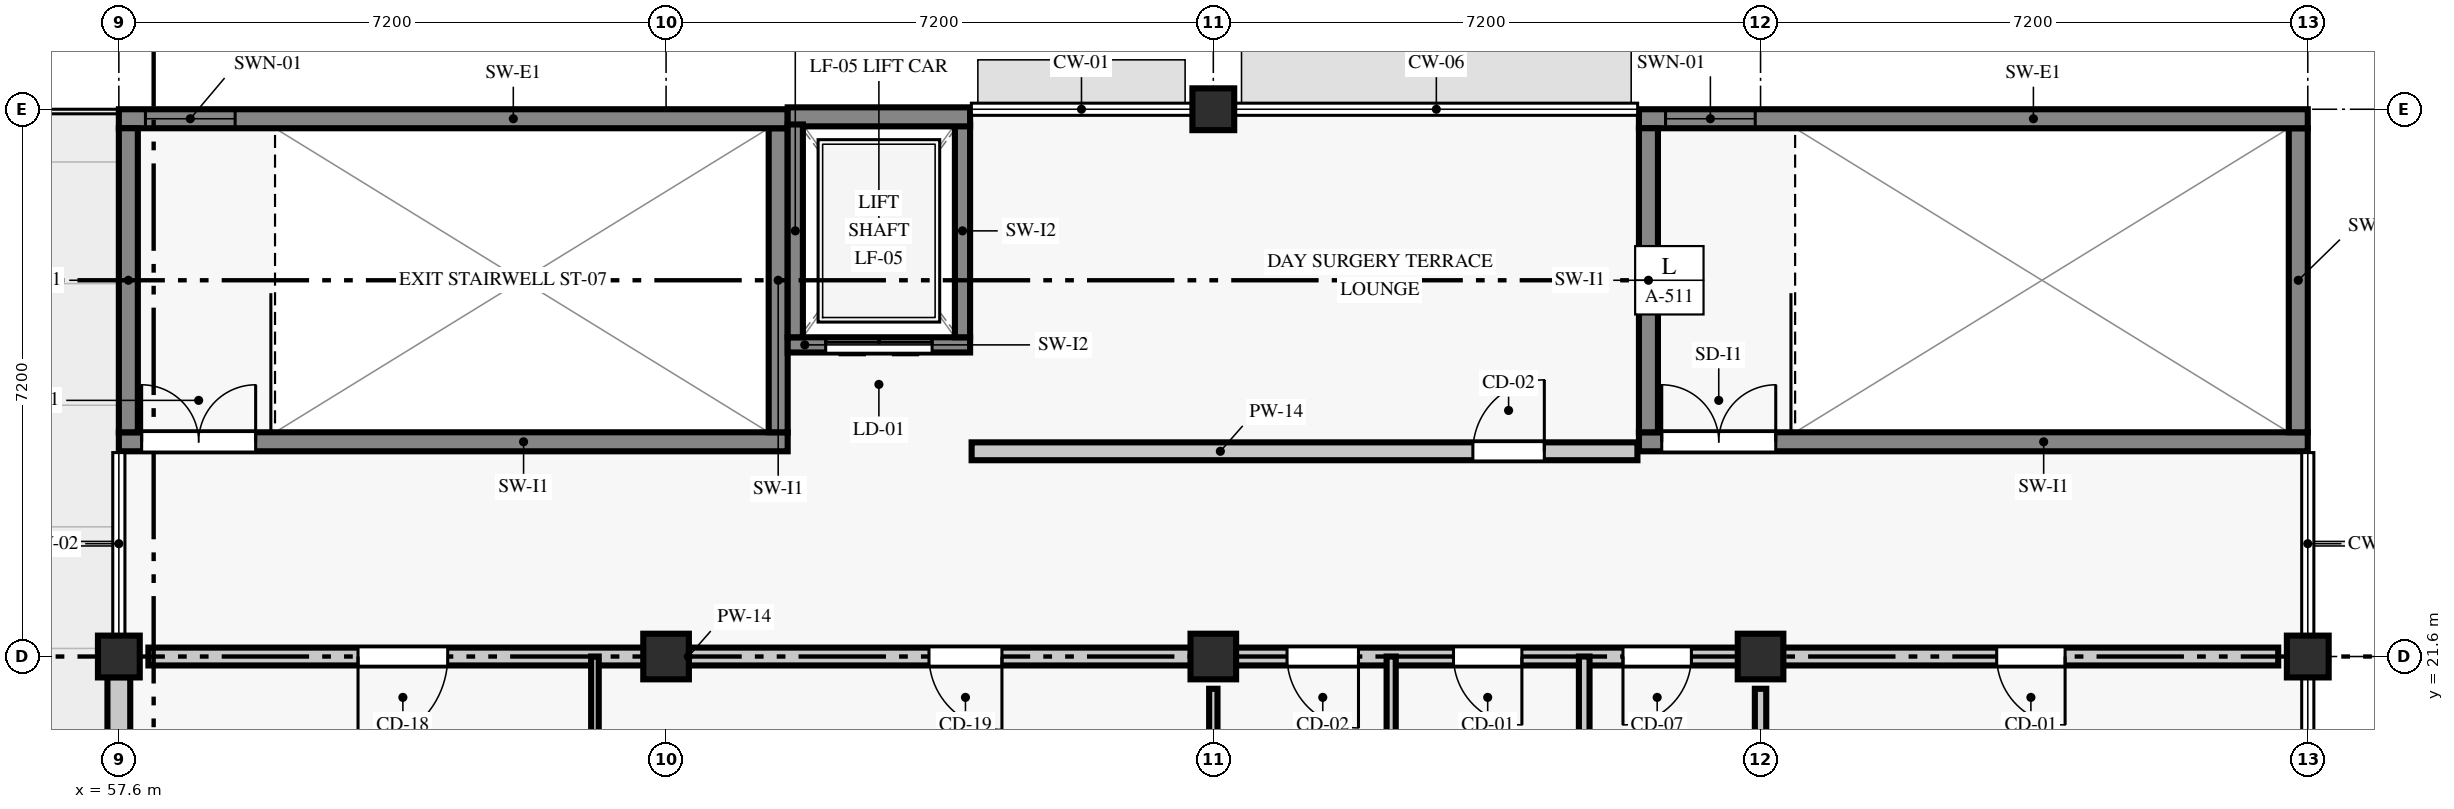
"""IFC4 building model, lengths in metres.
Left out: names, types, materials, properties, quantities, classifications, styles, units other than length and angle.
Written with IfcOpenShell. Run it as: python <this file> out.ifc"""

import sys

from ifc_helpers import new_model, si_unit, direction, frame, frame_2d, origin, origin_2d, place, context, subcontext, project, spatial, rectangle, extrude, element, fill, save


model = new_model("IFC4")
c1 = context("Model", 3, precision=1e-05, world=origin(), true_north=direction((0.0, 1.0)))
c2 = subcontext(c1, "Body", "Model", "MODEL_VIEW")
j1 = project(units=[si_unit("LENGTHUNIT", "METRE"), si_unit("PLANEANGLEUNIT", "RADIAN")], contexts=[c1])
p1 = place(None, origin())
s1 = spatial("IfcSite", under=j1, at=p1, CompositionType="ELEMENT")
p2 = place(p1, origin())
s2 = spatial("IfcBuilding", under=s1, at=p2, CompositionType="ELEMENT")
p3 = place(p2, frame((0.0, 0.0, 13.8)))
s3 = spatial("IfcBuildingStorey", under=s2, at=p3, CompositionType="ELEMENT", Elevation=13.8)
p4 = place(p3, frame((57.6, 21.6, 0.0), z_axis=(0.0, 0.0, 1.0), x_axis=(1.0, 0.0, 0.0)))
e1 = element("IfcColumn", 1, at=p4, inside=s3, PredefinedType="COLUMN", context=c2, shape_type="SweptSolid", body=[
    extrude(rectangle(XDim=0.55, YDim=0.55, at=origin_2d()), origin(), (0.0, 0.0, 1.0), 4.2),
])
for number, where, z_axis, x_axis in (
    (2, (64.8, 21.6, 0.0), (0.0, 0.0, 1.0), (1.0, 0.0, 0.0)),
    (3, (72.0, 21.6, 0.0), (0.0, 0.0, 1.0), (1.0, 0.0, 0.0)),
):
    element("IfcColumn", number, at=place(p3, frame(where, z_axis=z_axis, x_axis=x_axis)), inside=s3, PredefinedType="COLUMN", context=c2, shape_type="SweptSolid", body=[
        extrude(rectangle(XDim=0.6, YDim=0.6, at=origin_2d()), origin(), (0.0, 0.0, 1.0), 4.2),
    ])
p5 = place(p3, frame((72.0, 28.8, 0.0), z_axis=(0.0, 0.0, 1.0), x_axis=(1.0, 0.0, 0.0)))
e4 = element("IfcColumn", 4, at=p5, inside=s3, PredefinedType="COLUMN", context=c2, shape_type="SweptSolid", body=[
    extrude(rectangle(XDim=0.55, YDim=0.55, at=origin_2d()), origin(), (0.0, 0.0, 1.0), 4.2),
])
p6 = place(p3, frame((79.2, 21.6, 0.0), z_axis=(0.0, 0.0, 1.0), x_axis=(1.0, 0.0, 0.0)))
e5 = element("IfcColumn", 5, at=p6, inside=s3, PredefinedType="COLUMN", context=c2, shape_type="SweptSolid", body=[
    extrude(rectangle(XDim=0.6, YDim=0.6, at=origin_2d()), origin(), (0.0, 0.0, 1.0), 4.2),
])
p7 = place(p3, frame((86.4, 21.6, 0.0), z_axis=(0.0, 0.0, 1.0), x_axis=(1.0, 0.0, 0.0)))
e6 = element("IfcColumn", 6, at=p7, inside=s3, PredefinedType="COLUMN", context=c2, shape_type="SweptSolid", body=[
    extrude(rectangle(XDim=0.55, YDim=0.55, at=origin_2d()), origin(), (0.0, 0.0, 1.0), 4.2),
])
p8 = place(p3, frame((57.6, 21.329, 0.0), z_axis=(0.0, 0.0, 1.0), x_axis=(0.0, -1.0, 0.0)))
e7 = element("IfcWall", 7, at=p8, inside=s3, PredefinedType="STANDARD", context=c2, shape_type="SweptSolid", body=[
    extrude(rectangle(XDim=6.658, YDim=0.3, at=frame_2d((3.329, 0.0))), origin(), (0.0, 0.0, 1.0), 3.55),
])
p9 = place(p8, frame((2.689, 0.0, 0.0)))
e8 = element("IfcOpeningElement", 8, at=p9, cuts=e7, PredefinedType="OPENING", context=c2, shape_type="SweptSolid", body=[
    extrude(rectangle(XDim=1.28, YDim=2.15, at=frame_2d((0.64, 1.075))), frame((0.0, 0.16, 0.0), z_axis=(0.0, -1.0, 0.0), x_axis=(1.0, 0.0, 0.0)), (0.0, 0.0, 1.0), 0.32),
])
p10 = place(p3, frame((57.6, 24.425, 0.0), z_axis=(0.0, 0.0, 1.0), x_axis=(1.0, 0.0, 0.0)))
e9 = element("IfcWall", 9, at=p10, inside=s3, PredefinedType="SHEAR", context=c2, shape_type="SweptSolid", body=[
    extrude(rectangle(XDim=8.8, YDim=0.25, at=frame_2d((4.4, 0.0))), origin(), (0.0, 0.0, 1.0), 4.2),
])
p11 = place(p10, frame((0.3, 0.0, 0.0)))
e10 = element("IfcOpeningElement", 10, at=p11, cuts=e9, PredefinedType="OPENING", context=c2, shape_type="SweptSolid", body=[
    extrude(rectangle(XDim=1.5, YDim=2.15, at=frame_2d((0.75, 1.075))), frame((0.0, 0.135, 0.0), z_axis=(0.0, -1.0, 0.0), x_axis=(1.0, 0.0, 0.0)), (0.0, 0.0, 1.0), 0.27),
])
p12 = place(p3, frame((66.275, 24.55, 0.0), z_axis=(0.0, 0.0, 1.0), x_axis=(0.0, 1.0, 0.0)))
e11 = element("IfcWall", 11, at=p12, inside=s3, PredefinedType="SHEAR", context=c2, shape_type="SweptSolid", body=[
    extrude(rectangle(XDim=4.0, YDim=0.25, at=frame_2d((2.0, 0.0))), origin(), (0.0, 0.0, 1.0), 4.2),
])
p13 = place(p3, frame((66.4, 28.675, 0.0), z_axis=(0.0, 0.0, 1.0), x_axis=(-1.0, 0.0, 0.0)))
e12 = element("IfcWall", 12, at=p13, inside=s3, PredefinedType="SHEAR", context=c2, shape_type="SweptSolid", body=[
    extrude(rectangle(XDim=8.8, YDim=0.25, at=frame_2d((4.4, 0.0))), origin(), (0.0, 0.0, 1.0), 4.2),
])
p14 = place(p13, frame((7.27, 0.0, 0.92)))
e13 = element("IfcOpeningElement", 13, at=p14, cuts=e12, PredefinedType="OPENING", context=c2, shape_type="SweptSolid", body=[
    extrude(rectangle(XDim=1.18, YDim=1.48, at=frame_2d((0.59, 0.74))), frame((0.0, 0.135, 0.0), z_axis=(0.0, -1.0, 0.0), x_axis=(1.0, 0.0, 0.0)), (0.0, 0.0, 1.0), 0.27),
])
p15 = place(p3, frame((57.725, 28.55, 0.0), z_axis=(0.0, 0.0, 1.0), x_axis=(0.0, -1.0, 0.0)))
e14 = element("IfcWall", 14, at=p15, inside=s3, PredefinedType="SHEAR", context=c2, shape_type="SweptSolid", body=[
    extrude(rectangle(XDim=4.0, YDim=0.25, at=frame_2d((2.0, 0.0))), origin(), (0.0, 0.0, 1.0), 4.2),
])
p16 = place(p3, frame((77.6, 24.425, 0.0), z_axis=(0.0, 0.0, 1.0), x_axis=(1.0, 0.0, 0.0)))
e15 = element("IfcWall", 15, at=p16, inside=s3, PredefinedType="SHEAR", context=c2, shape_type="SweptSolid", body=[
    extrude(rectangle(XDim=8.8, YDim=0.25, at=frame_2d((4.4, 0.0))), origin(), (0.0, 0.0, 1.0), 4.2),
])
p17 = place(p16, frame((0.3, 0.0, 0.0)))
e16 = element("IfcOpeningElement", 16, at=p17, cuts=e15, PredefinedType="OPENING", context=c2, shape_type="SweptSolid", body=[
    extrude(rectangle(XDim=1.5, YDim=2.15, at=frame_2d((0.75, 1.075))), frame((0.0, 0.135, 0.0), z_axis=(0.0, -1.0, 0.0), x_axis=(1.0, 0.0, 0.0)), (0.0, 0.0, 1.0), 0.27),
])
p18 = place(p3, frame((86.275, 24.55, 0.0), z_axis=(0.0, 0.0, 1.0), x_axis=(0.0, 1.0, 0.0)))
e17 = element("IfcWall", 17, at=p18, inside=s3, PredefinedType="SHEAR", context=c2, shape_type="SweptSolid", body=[
    extrude(rectangle(XDim=4.0, YDim=0.25, at=frame_2d((2.0, 0.0))), origin(), (0.0, 0.0, 1.0), 4.2),
])
p19 = place(p3, frame((86.4, 28.675, 0.0), z_axis=(0.0, 0.0, 1.0), x_axis=(-1.0, 0.0, 0.0)))
e18 = element("IfcWall", 18, at=p19, inside=s3, PredefinedType="SHEAR", context=c2, shape_type="SweptSolid", body=[
    extrude(rectangle(XDim=8.8, YDim=0.25, at=frame_2d((4.4, 0.0))), origin(), (0.0, 0.0, 1.0), 4.2),
])
p20 = place(p19, frame((7.27, 0.0, 0.92)))
e19 = element("IfcOpeningElement", 19, at=p20, cuts=e18, PredefinedType="OPENING", context=c2, shape_type="SweptSolid", body=[
    extrude(rectangle(XDim=1.18, YDim=1.48, at=frame_2d((0.59, 0.74))), frame((0.0, 0.135, 0.0), z_axis=(0.0, -1.0, 0.0), x_axis=(1.0, 0.0, 0.0)), (0.0, 0.0, 1.0), 0.27),
])
p21 = place(p3, frame((77.725, 28.55, 0.0), z_axis=(0.0, 0.0, 1.0), x_axis=(0.0, -1.0, 0.0)))
e20 = element("IfcWall", 20, at=p21, inside=s3, PredefinedType="SHEAR", context=c2, shape_type="SweptSolid", body=[
    extrude(rectangle(XDim=4.0, YDim=0.25, at=frame_2d((2.0, 0.0))), origin(), (0.0, 0.0, 1.0), 4.2),
])
p22 = place(p3, frame((66.4, 25.7, 0.0), z_axis=(0.0, 0.0, 1.0), x_axis=(1.0, 0.0, 0.0)))
e21 = element("IfcWall", 21, at=p22, inside=s3, PredefinedType="SHEAR", context=c2, shape_type="SweptSolid", body=[
    extrude(rectangle(XDim=2.4, YDim=0.2, at=frame_2d((1.2, 0.0))), origin(), (0.0, 0.0, 1.0), 4.2),
])
p23 = place(p22, frame((0.5, 0.0, 0.0)))
e22 = element("IfcOpeningElement", 22, at=p23, cuts=e21, PredefinedType="OPENING", context=c2, shape_type="SweptSolid", body=[
    extrude(rectangle(XDim=1.4, YDim=2.15, at=frame_2d((0.7, 1.075))), frame((0.0, 0.11, 0.0), z_axis=(0.0, -1.0, 0.0), x_axis=(1.0, 0.0, 0.0)), (0.0, 0.0, 1.0), 0.22),
])
p24 = place(p3, frame((68.7, 25.8, 0.0), z_axis=(0.0, 0.0, 1.0), x_axis=(0.0, 1.0, 0.0)))
e23 = element("IfcWall", 23, at=p24, inside=s3, PredefinedType="SHEAR", context=c2, shape_type="SweptSolid", body=[
    extrude(rectangle(XDim=2.8, YDim=0.2, at=frame_2d((1.4, 0.0))), origin(), (0.0, 0.0, 1.0), 4.2),
])
p25 = place(p3, frame((68.8, 28.7, 0.0), z_axis=(0.0, 0.0, 1.0), x_axis=(-1.0, 0.0, 0.0)))
e24 = element("IfcWall", 24, at=p25, inside=s3, PredefinedType="SHEAR", context=c2, shape_type="SweptSolid", body=[
    extrude(rectangle(XDim=2.4, YDim=0.25, at=frame_2d((1.2, 0.0))), origin(), (0.0, 0.0, 1.0), 4.2),
])
p26 = place(p3, frame((66.5, 28.6, 0.0), z_axis=(0.0, 0.0, 1.0), x_axis=(0.0, -1.0, 0.0)))
e25 = element("IfcWall", 25, at=p26, inside=s3, PredefinedType="SHEAR", context=c2, shape_type="SweptSolid", body=[
    extrude(rectangle(XDim=2.8, YDim=0.2, at=frame_2d((1.4, 0.0))), origin(), (0.0, 0.0, 1.0), 4.2),
])
p27 = place(p3, frame((57.989, 21.6, 0.0), z_axis=(0.0, 0.0, 1.0), x_axis=(1.0, 0.0, 0.0)))
e26 = element("IfcWall", 26, at=p27, inside=s3, PredefinedType="PARTITIONING", context=c2, shape_type="SweptSolid", body=[
    extrude(rectangle(XDim=28.022, YDim=0.235, at=frame_2d((14.011, 0.0))), origin(), (0.0, 0.0, 1.0), 3.35),
])
p28 = place(p27, frame((2.758, 0.0, 0.0)))
e27 = element("IfcOpeningElement", 27, at=p28, cuts=e26, PredefinedType="OPENING", context=c2, shape_type="SweptSolid", body=[
    extrude(rectangle(XDim=1.18, YDim=2.18, at=frame_2d((0.59, 1.09))), frame((0.0, 0.127, 0.0), z_axis=(0.0, -1.0, 0.0), x_axis=(1.0, 0.0, 0.0)), (0.0, 0.0, 1.0), 0.255),
])
p29 = place(p27, frame((10.27, 0.0, 0.0)))
e28 = element("IfcOpeningElement", 28, at=p29, cuts=e26, PredefinedType="OPENING", context=c2, shape_type="SweptSolid", body=[
    extrude(rectangle(XDim=0.96, YDim=2.23, at=frame_2d((0.48, 1.115))), frame((0.0, 0.127, 0.0), z_axis=(0.0, -1.0, 0.0), x_axis=(1.0, 0.0, 0.0)), (0.0, 0.0, 1.0), 0.255),
])
p30 = place(p27, frame((14.981, 0.0, 0.0)))
e29 = element("IfcOpeningElement", 29, at=p30, cuts=e26, PredefinedType="OPENING", context=c2, shape_type="SweptSolid", body=[
    extrude(rectangle(XDim=0.94, YDim=2.08, at=frame_2d((0.47, 1.04))), frame((0.0, 0.127, 0.0), z_axis=(0.0, -1.0, 0.0), x_axis=(1.0, 0.0, 0.0)), (0.0, 0.0, 1.0), 0.255),
])
p31 = place(p27, frame((17.171, 0.0, 0.0)))
e30 = element("IfcOpeningElement", 30, at=p31, cuts=e26, PredefinedType="OPENING", context=c2, shape_type="SweptSolid", body=[
    extrude(rectangle(XDim=0.9, YDim=2.08, at=frame_2d((0.45, 1.04))), frame((0.0, 0.127, 0.0), z_axis=(0.0, -1.0, 0.0), x_axis=(1.0, 0.0, 0.0)), (0.0, 0.0, 1.0), 0.255),
])
p32 = place(p27, frame((19.401, 0.0, 0.0)))
e31 = element("IfcOpeningElement", 31, at=p32, cuts=e26, PredefinedType="OPENING", context=c2, shape_type="SweptSolid", body=[
    extrude(rectangle(XDim=0.9, YDim=2.13, at=frame_2d((0.45, 1.065))), frame((0.0, 0.127, 0.0), z_axis=(0.0, -1.0, 0.0), x_axis=(1.0, 0.0, 0.0)), (0.0, 0.0, 1.0), 0.255),
])
p33 = place(p27, frame((24.318, 0.0, 0.0)))
e32 = element("IfcOpeningElement", 32, at=p33, cuts=e26, PredefinedType="OPENING", context=c2, shape_type="SweptSolid", body=[
    extrude(rectangle(XDim=0.9, YDim=2.08, at=frame_2d((0.45, 1.04))), frame((0.0, 0.127, 0.0), z_axis=(0.0, -1.0, 0.0), x_axis=(1.0, 0.0, 0.0)), (0.0, 0.0, 1.0), 0.255),
])
p34 = place(p3, frame((63.864, 14.44, 0.0), z_axis=(0.0, 0.0, 1.0), x_axis=(0.0, 1.0, 0.0)))
e33 = element("IfcWall", 33, at=p34, inside=s3, PredefinedType="PARTITIONING", context=c2, shape_type="SweptSolid", body=[
    extrude(rectangle(XDim=7.16, YDim=0.1, at=frame_2d((3.58, 0.0))), origin(), (0.0, 0.0, 1.0), 3.35),
])
p35 = place(p3, frame((72.0, 14.789, 0.0), z_axis=(0.0, 0.0, 1.0), x_axis=(0.0, 1.0, 0.0)))
e34 = element("IfcWall", 34, at=p35, inside=s3, PredefinedType="PARTITIONING", context=c2, shape_type="SweptSolid", body=[
    extrude(rectangle(XDim=6.387, YDim=0.11, at=frame_2d((3.193, 0.0))), origin(), (0.0, 0.0, 1.0), 3.6),
])
p36 = place(p3, frame((74.34, 18.2, 0.0), z_axis=(0.0, 0.0, 1.0), x_axis=(0.0, 1.0, 0.0)))
e35 = element("IfcWall", 35, at=p36, inside=s3, PredefinedType="PARTITIONING", context=c2, shape_type="SweptSolid", body=[
    extrude(rectangle(XDim=3.4, YDim=0.12, at=frame_2d((1.7, 0.0))), origin(), (0.0, 0.0, 1.0), 3.35),
])
p37 = place(p3, frame((76.88, 14.44, 0.0), z_axis=(0.0, 0.0, 1.0), x_axis=(0.0, 1.0, 0.0)))
e36 = element("IfcWall", 36, at=p37, inside=s3, PredefinedType="PARTITIONING", context=c2, shape_type="SweptSolid", body=[
    extrude(rectangle(XDim=7.16, YDim=0.14, at=frame_2d((3.58, 0.0))), origin(), (0.0, 0.0, 1.0), 3.35),
])
p38 = place(p3, frame((79.2, 14.789, 0.0), z_axis=(0.0, 0.0, 1.0), x_axis=(0.0, 1.0, 0.0)))
e37 = element("IfcWall", 37, at=p38, inside=s3, PredefinedType="PARTITIONING", context=c2, shape_type="SweptSolid", body=[
    extrude(rectangle(XDim=6.387, YDim=0.15, at=frame_2d((3.193, 0.0))), origin(), (0.0, 0.0, 1.0), 3.6),
])
p39 = place(p3, frame((68.82, 24.3, 0.0), z_axis=(0.0, 0.0, 1.0), x_axis=(1.0, 0.0, 0.0)))
e38 = element("IfcWall", 38, at=p39, inside=s3, PredefinedType="PARTITIONING", context=c2, shape_type="SweptSolid", body=[
    extrude(rectangle(XDim=8.76, YDim=0.235, at=frame_2d((4.38, 0.0))), origin(), (0.0, 0.0, 1.0), 3.6),
])
p40 = place(p39, frame((6.595, 0.0, 0.0)))
e39 = element("IfcOpeningElement", 39, at=p40, cuts=e38, PredefinedType="OPENING", context=c2, shape_type="SweptSolid", body=[
    extrude(rectangle(XDim=0.94, YDim=2.08, at=frame_2d((0.47, 1.04))), frame((0.0, 0.127, 0.0), z_axis=(0.0, -1.0, 0.0), x_axis=(1.0, 0.0, 0.0)), (0.0, 0.0, 1.0), 0.255),
])
p41 = place(p11, origin())
e40 = element("IfcDoor", 40, at=p41, inside=s3, OperationType="DOUBLE_DOOR_SINGLE_SWING", PredefinedType="DOOR", context=c2, shape_type="SweptSolid", body=[
    extrude(rectangle(XDim=1.5, YDim=2.15, at=frame_2d((0.75, 1.075))), frame((0.0, 0.025, 0.0), z_axis=(0.0, -1.0, 0.0), x_axis=(1.0, 0.0, 0.0)), (0.0, 0.0, 1.0), 0.05),
])
fill(e10, e40)
p42 = place(p14, origin())
e41 = element("IfcWindow", 41, at=p42, inside=s3, PartitioningType="SINGLE_PANEL", PredefinedType="WINDOW", context=c2, shape_type="SweptSolid", body=[
    extrude(rectangle(XDim=1.18, YDim=1.48, at=frame_2d((0.59, 0.74))), frame((0.0, 0.03, 0.0), z_axis=(0.0, -1.0, 0.0), x_axis=(1.0, 0.0, 0.0)), (0.0, 0.0, 1.0), 0.06),
])
fill(e13, e41)
p43 = place(p17, origin())
e42 = element("IfcDoor", 42, at=p43, inside=s3, OperationType="DOUBLE_DOOR_SINGLE_SWING", PredefinedType="DOOR", context=c2, shape_type="SweptSolid", body=[
    extrude(rectangle(XDim=1.5, YDim=2.15, at=frame_2d((0.75, 1.075))), frame((0.0, 0.025, 0.0), z_axis=(0.0, -1.0, 0.0), x_axis=(1.0, 0.0, 0.0)), (0.0, 0.0, 1.0), 0.05),
])
fill(e16, e42)
p44 = place(p20, origin())
e43 = element("IfcWindow", 43, at=p44, inside=s3, PartitioningType="SINGLE_PANEL", PredefinedType="WINDOW", context=c2, shape_type="SweptSolid", body=[
    extrude(rectangle(XDim=1.18, YDim=1.48, at=frame_2d((0.59, 0.74))), frame((0.0, 0.03, 0.0), z_axis=(0.0, -1.0, 0.0), x_axis=(1.0, 0.0, 0.0)), (0.0, 0.0, 1.0), 0.06),
])
fill(e19, e43)
p45 = place(p23, frame((1.4, 0.0, 0.0), z_axis=(0.0, 0.0, 1.0), x_axis=(-1.0, 0.0, 0.0)))
e44 = element("IfcDoor", 44, at=p45, inside=s3, OperationType="DOUBLE_DOOR_SLIDING", PredefinedType="DOOR", context=c2, shape_type="SweptSolid", body=[
    extrude(rectangle(XDim=1.4, YDim=2.15, at=frame_2d((0.7, 1.075))), frame((0.0, 0.025, 0.0), z_axis=(0.0, -1.0, 0.0), x_axis=(1.0, 0.0, 0.0)), (0.0, 0.0, 1.0), 0.05),
])
fill(e22, e44)
p46 = place(p28, frame((1.18, 0.0, 0.0), z_axis=(0.0, 0.0, 1.0), x_axis=(-1.0, 0.0, 0.0)))
e45 = element("IfcDoor", 45, at=p46, inside=s3, OperationType="SINGLE_SWING_RIGHT", PredefinedType="DOOR", context=c2, shape_type="SweptSolid", body=[
    extrude(rectangle(XDim=1.18, YDim=2.18, at=frame_2d((0.59, 1.09))), frame((0.0, 0.025, 0.0), z_axis=(0.0, -1.0, 0.0), x_axis=(1.0, 0.0, 0.0)), (0.0, 0.0, 1.0), 0.05),
])
fill(e27, e45)
p47 = place(p29, frame((0.96, 0.0, 0.0), z_axis=(0.0, 0.0, 1.0), x_axis=(-1.0, 0.0, 0.0)))
e46 = element("IfcDoor", 46, at=p47, inside=s3, OperationType="SINGLE_SWING_LEFT", PredefinedType="DOOR", context=c2, shape_type="SweptSolid", body=[
    extrude(rectangle(XDim=0.96, YDim=2.23, at=frame_2d((0.48, 1.115))), frame((0.0, 0.025, 0.0), z_axis=(0.0, -1.0, 0.0), x_axis=(1.0, 0.0, 0.0)), (0.0, 0.0, 1.0), 0.05),
])
fill(e28, e46)
p48 = place(p30, frame((0.94, 0.0, 0.0), z_axis=(0.0, 0.0, 1.0), x_axis=(-1.0, 0.0, 0.0)))
e47 = element("IfcDoor", 47, at=p48, inside=s3, OperationType="SINGLE_SWING_LEFT", PredefinedType="DOOR", context=c2, shape_type="SweptSolid", body=[
    extrude(rectangle(XDim=0.94, YDim=2.08, at=frame_2d((0.47, 1.04))), frame((0.0, 0.025, 0.0), z_axis=(0.0, -1.0, 0.0), x_axis=(1.0, 0.0, 0.0)), (0.0, 0.0, 1.0), 0.05),
])
fill(e29, e47)
p49 = place(p31, frame((0.9, 0.0, 0.0), z_axis=(0.0, 0.0, 1.0), x_axis=(-1.0, 0.0, 0.0)))
e48 = element("IfcDoor", 48, at=p49, inside=s3, OperationType="SINGLE_SWING_LEFT", PredefinedType="DOOR", context=c2, shape_type="SweptSolid", body=[
    extrude(rectangle(XDim=0.9, YDim=2.08, at=frame_2d((0.45, 1.04))), frame((0.0, 0.025, 0.0), z_axis=(0.0, -1.0, 0.0), x_axis=(1.0, 0.0, 0.0)), (0.0, 0.0, 1.0), 0.05),
])
fill(e30, e48)
p50 = place(p32, frame((0.9, 0.0, 0.0), z_axis=(0.0, 0.0, 1.0), x_axis=(-1.0, 0.0, 0.0)))
e49 = element("IfcDoor", 49, at=p50, inside=s3, OperationType="SINGLE_SWING_RIGHT", PredefinedType="DOOR", context=c2, shape_type="SweptSolid", body=[
    extrude(rectangle(XDim=0.9, YDim=2.13, at=frame_2d((0.45, 1.065))), frame((0.0, 0.025, 0.0), z_axis=(0.0, -1.0, 0.0), x_axis=(1.0, 0.0, 0.0)), (0.0, 0.0, 1.0), 0.05),
])
fill(e31, e49)
p51 = place(p33, frame((0.9, 0.0, 0.0), z_axis=(0.0, 0.0, 1.0), x_axis=(-1.0, 0.0, 0.0)))
e50 = element("IfcDoor", 50, at=p51, inside=s3, OperationType="SINGLE_SWING_LEFT", PredefinedType="DOOR", context=c2, shape_type="SweptSolid", body=[
    extrude(rectangle(XDim=0.9, YDim=2.08, at=frame_2d((0.45, 1.04))), frame((0.0, 0.025, 0.0), z_axis=(0.0, -1.0, 0.0), x_axis=(1.0, 0.0, 0.0)), (0.0, 0.0, 1.0), 0.05),
])
fill(e32, e50)
p52 = place(p40, origin())
e51 = element("IfcDoor", 51, at=p52, inside=s3, OperationType="SINGLE_SWING_RIGHT", PredefinedType="DOOR", context=c2, shape_type="SweptSolid", body=[
    extrude(rectangle(XDim=0.94, YDim=2.08, at=frame_2d((0.47, 1.04))), frame((0.0, 0.025, 0.0), z_axis=(0.0, -1.0, 0.0), x_axis=(1.0, 0.0, 0.0)), (0.0, 0.0, 1.0), 0.05),
])
fill(e39, e51)
save(model, sys.argv[1])
